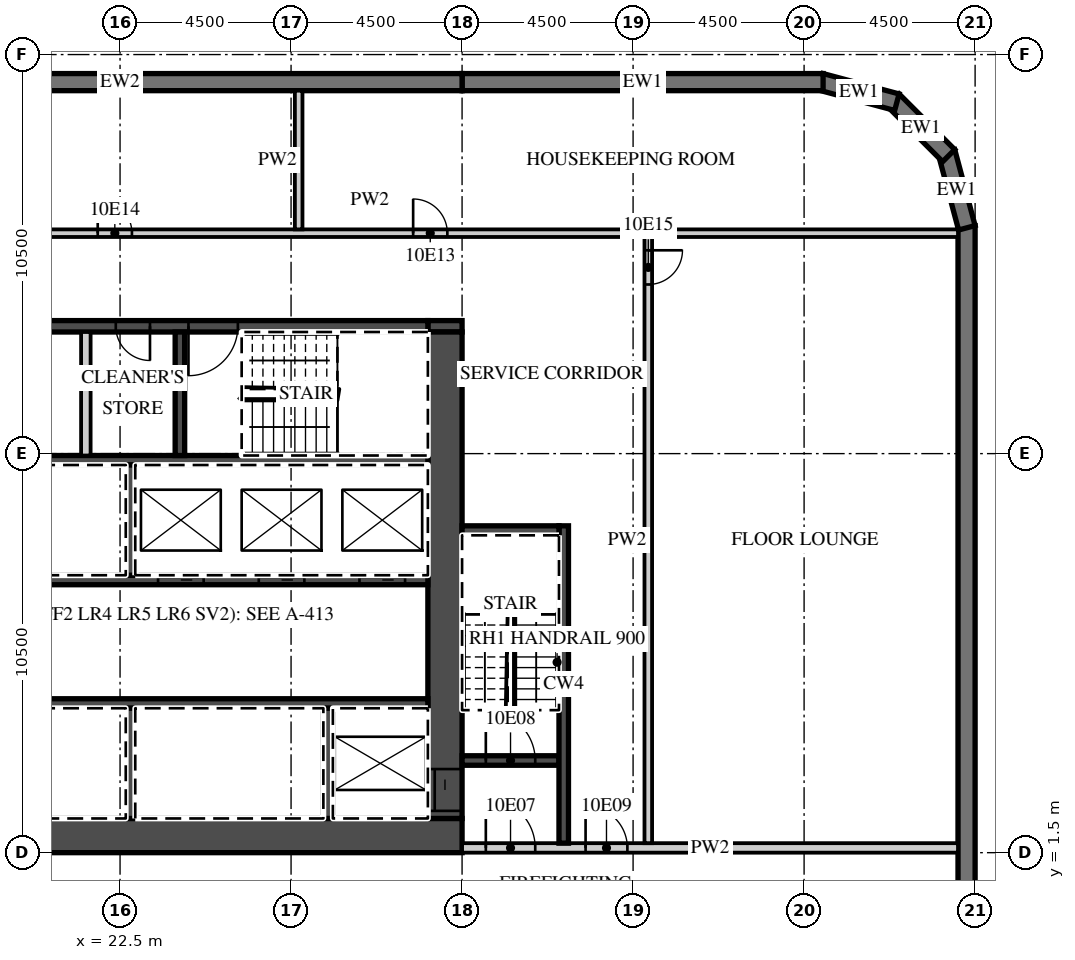
"""IFC4 building model, lengths in metres.
Left out: names, types, materials, properties, quantities, classifications, styles, units other than length and angle.
Written with IfcOpenShell. Run it as: python <this file> out.ifc"""

import sys

from ifc_helpers import new_model, si_unit, direction, frame, frame_2d, origin, place, context, subcontext, project, spatial, polyline, rectangle, outline, extrude, element, fill, save


model = new_model("IFC4")
c1 = context("Model", 3, precision=1e-05, world=origin(), true_north=direction((0.0, 1.0)))
c2 = subcontext(c1, "Body", "Model", "MODEL_VIEW")
j1 = project(units=[si_unit("LENGTHUNIT", "METRE"), si_unit("PLANEANGLEUNIT", "RADIAN")], contexts=[c1])
p1 = place(None, origin())
s1 = spatial("IfcSite", under=j1, at=p1, CompositionType="ELEMENT")
p2 = place(p1, origin())
s2 = spatial("IfcBuilding", under=s1, at=p2, CompositionType="ELEMENT")
p3 = place(p2, frame((0.0, 0.0, 63.3)))
s3 = spatial("IfcBuildingStorey", under=s2, at=p3, CompositionType="ELEMENT", Elevation=63.3)
p4 = place(p3, frame((44.775, -18.0, 0.0), z_axis=(0.0, 0.0, 1.0), x_axis=(0.0, 1.0, 0.0)))
e1 = element("IfcWall", 1, at=p4, inside=s3, PredefinedType="SOLIDWALL", context=c2, shape_type="SweptSolid", body=[
    extrude(rectangle(XDim=36.0, YDim=0.45, at=frame_2d((18.0, 0.0))), origin(), (0.0, 0.0, 1.0), 3.02),
])
p5 = place(p4, frame((3.9, 0.0, 0.45)))
e2 = element("IfcOpeningElement", 2, at=p5, cuts=e1, PredefinedType="OPENING", context=c2, shape_type="SweptSolid", body=[
    extrude(rectangle(XDim=3.3, YDim=2.25, at=frame_2d((1.65, 1.125))), frame((0.0, 0.235, 0.0), z_axis=(0.0, -1.0, 0.0), x_axis=(1.0, 0.0, 0.0)), (0.0, 0.0, 1.0), 0.47),
])
p6 = place(p4, frame((8.4, 0.0, 0.45)))
e3 = element("IfcOpeningElement", 3, at=p6, cuts=e1, PredefinedType="OPENING", context=c2, shape_type="SweptSolid", body=[
    extrude(rectangle(XDim=3.3, YDim=2.25, at=frame_2d((1.65, 1.125))), frame((0.0, 0.235, 0.0), z_axis=(0.0, -1.0, 0.0), x_axis=(1.0, 0.0, 0.0)), (0.0, 0.0, 1.0), 0.47),
])
p7 = place(p4, frame((12.9, 0.0, 0.45)))
e4 = element("IfcOpeningElement", 4, at=p7, cuts=e1, PredefinedType="OPENING", context=c2, shape_type="SweptSolid", body=[
    extrude(rectangle(XDim=3.3, YDim=2.25, at=frame_2d((1.65, 1.125))), frame((0.0, 0.235, 0.0), z_axis=(0.0, -1.0, 0.0), x_axis=(1.0, 0.0, 0.0)), (0.0, 0.0, 1.0), 0.47),
])
p8 = place(p3, frame((44.783, 17.942, 0.0), z_axis=(0.0, 0.0, 1.0), x_axis=(-0.25881466832, 0.965926999034, 0.0)))
e5 = element("IfcWall", 5, at=p8, inside=s3, PredefinedType="SOLIDWALL", context=c2, shape_type="SweptSolid", body=[
    extrude(outline(polyline([(0.0, -0.225), (2.071, -0.225), (1.95, 0.225), (0.121, 0.225), (0.0, -0.225)])), origin(), (0.0, 0.0, 1.0), 3.02),
])
p9 = place(p3, frame((44.305, 19.841, 0.0), z_axis=(0.0, 0.0, 1.0), x_axis=(-0.707106781187, 0.707106781187, 0.0)))
e6 = element("IfcWall", 6, at=p9, inside=s3, PredefinedType="SOLIDWALL", context=c2, shape_type="SweptSolid", body=[
    extrude(outline(polyline([(0.0, -0.225), (2.071, -0.225), (1.95, 0.225), (0.121, 0.225), (0.0, -0.225)])), origin(), (0.0, 0.0, 1.0), 3.02),
])
p10 = place(p3, frame((42.942, 21.247, 0.0), z_axis=(0.0, 0.0, 1.0), x_axis=(-0.965926999034, 0.25881466832, 0.0)))
e7 = element("IfcWall", 7, at=p10, inside=s3, PredefinedType="SOLIDWALL", context=c2, shape_type="SweptSolid", body=[
    extrude(outline(polyline([(-0.0, -0.225), (2.07, -0.225), (1.95, 0.225), (0.12, 0.225), (-0.0, -0.225)])), origin(), (0.0, 0.0, 1.0), 3.02),
])
p11 = place(p3, frame((41.0, 21.775, 0.0), z_axis=(0.0, 0.0, 1.0), x_axis=(-1.0, 0.0, 0.0)))
e8 = element("IfcWall", 8, at=p11, inside=s3, PredefinedType="SOLIDWALL", context=c2, shape_type="SweptSolid", body=[
    extrude(rectangle(XDim=9.5, YDim=0.45, at=frame_2d((4.75, 0.0))), origin(), (0.0, 0.0, 1.0), 3.02),
])
p12 = place(p3, frame((31.5, 21.775, 0.0), z_axis=(0.0, 0.0, 1.0), x_axis=(-1.0, 0.0, 0.0)))
e9 = element("IfcWall", 9, at=p12, inside=s3, PredefinedType="SOLIDWALL", context=c2, shape_type="SweptSolid", body=[
    extrude(rectangle(XDim=18.0, YDim=0.45, at=frame_2d((9.0, 0.0))), origin(), (0.0, 0.0, 1.0), 3.02),
])
p13 = place(p3, frame((13.5, 1.95, 0.0), z_axis=(0.0, 0.0, 1.0), x_axis=(1.0, 0.0, 0.0)))
e10 = element("IfcWall", 10, at=p13, inside=s3, PredefinedType="SHEAR", context=c2, shape_type="SweptSolid", body=[
    extrude(rectangle(XDim=18.0, YDim=0.9, at=frame_2d((9.0, 0.0))), origin(), (0.0, 0.0, 1.0), 3.02),
])
p14 = place(p13, frame((1.475, 0.0, 0.0)))
e11 = element("IfcOpeningElement", 11, at=p14, cuts=e10, PredefinedType="OPENING", context=c2, shape_type="SweptSolid", body=[
    extrude(rectangle(XDim=1.8, YDim=2.1, at=frame_2d((0.9, 1.05))), frame((0.0, 0.46, 0.0), z_axis=(0.0, -1.0, 0.0), x_axis=(1.0, 0.0, 0.0)), (0.0, 0.0, 1.0), 0.92),
])
p15 = place(p3, frame((30.6, 15.35, 0.0), z_axis=(0.0, 0.0, 1.0), x_axis=(1.0, 0.0, 0.0)))
e12 = element("IfcWall", 12, at=p15, inside=s3, PredefinedType="SHEAR", context=c2, shape_type="SweptSolid", body=[
    extrude(rectangle(XDim=0.9, YDim=0.3, at=frame_2d((0.45, 0.0))), origin(), (0.0, 0.0, 1.0), 3.02),
])
p16 = place(p3, frame((20.3, 15.35, 0.0), z_axis=(0.0, 0.0, 1.0), x_axis=(1.0, 0.0, 0.0)))
e13 = element("IfcWall", 13, at=p16, inside=s3, PredefinedType="SHEAR", context=c2, shape_type="SweptSolid", body=[
    extrude(rectangle(XDim=10.3, YDim=0.3, at=frame_2d((5.15, 0.0))), origin(), (0.0, 0.0, 1.0), 3.02),
])
p17 = place(p16, frame((4.0, 0.0, 0.0)))
e14 = element("IfcOpeningElement", 14, at=p17, cuts=e13, PredefinedType="OPENING", context=c2, shape_type="SweptSolid", body=[
    extrude(rectangle(XDim=1.3, YDim=2.1, at=frame_2d((0.65, 1.05))), frame((0.0, 0.16, 0.0), z_axis=(0.0, -1.0, 0.0), x_axis=(1.0, 0.0, 0.0)), (0.0, 0.0, 1.0), 0.32),
])
p18 = place(p16, frame((2.087, 0.0, 0.0)))
e15 = element("IfcOpeningElement", 15, at=p18, cuts=e13, PredefinedType="OPENING", context=c2, shape_type="SweptSolid", body=[
    extrude(rectangle(XDim=0.9, YDim=2.1, at=frame_2d((0.45, 1.05))), frame((0.0, 0.16, 0.0), z_axis=(0.0, -1.0, 0.0), x_axis=(1.0, 0.0, 0.0)), (0.0, 0.0, 1.0), 0.32),
])
p19 = place(p3, frame((31.05, 2.4, 0.0), z_axis=(0.0, 0.0, 1.0), x_axis=(0.0, 1.0, 0.0)))
e16 = element("IfcWall", 16, at=p19, inside=s3, PredefinedType="SHEAR", context=c2, shape_type="SweptSolid", body=[
    extrude(rectangle(XDim=12.8, YDim=0.9, at=frame_2d((6.4, 0.0))), origin(), (0.0, 0.0, 1.0), 3.02),
])
p20 = place(p19, frame((0.2, 0.0, 0.0)))
e17 = element("IfcOpeningElement", 17, at=p20, cuts=e16, PredefinedType="OPENING", context=c2, shape_type="SweptSolid", body=[
    extrude(rectangle(XDim=1.1, YDim=2.1, at=frame_2d((0.55, 1.05))), frame((0.0, 0.46, 0.0), z_axis=(0.0, -1.0, 0.0), x_axis=(1.0, 0.0, 0.0)), (0.0, 0.0, 1.0), 0.92),
])
p21 = place(p3, frame((17.6, 5.425, 0.0), z_axis=(0.0, 0.0, 1.0), x_axis=(1.0, 0.0, 0.0)))
e18 = element("IfcWall", 18, at=p21, inside=s3, PredefinedType="SHEAR", context=c2, shape_type="SweptSolid", body=[
    extrude(rectangle(XDim=13.0, YDim=0.25, at=frame_2d((6.5, 0.0))), origin(), (0.0, 0.0, 1.0), 3.02),
])
for number, where, z_axis, x_axis in (
    (19, (27.975, 2.4, 0.0), (0.0, 0.0, 1.0), (0.0, 1.0, 0.0)),
    (20, (22.775, 2.4, 0.0), (0.0, 0.0, 1.0), (0.0, 1.0, 0.0)),
):
    element("IfcWall", number, at=place(p3, frame(where, z_axis=z_axis, x_axis=x_axis)), inside=s3, PredefinedType="SHEAR", context=c2, shape_type="SweptSolid", body=[
        extrude(rectangle(XDim=2.9, YDim=0.25, at=frame_2d((1.45, 0.0))), origin(), (0.0, 0.0, 1.0), 3.02),
    ])
p22 = place(p3, frame((14.4, 8.675, 0.0), z_axis=(0.0, 0.0, 1.0), x_axis=(1.0, 0.0, 0.0)))
e21 = element("IfcWall", 21, at=p22, inside=s3, PredefinedType="SHEAR", context=c2, shape_type="SweptSolid", body=[
    extrude(rectangle(XDim=16.2, YDim=0.25, at=frame_2d((8.1, 0.0))), origin(), (0.0, 0.0, 1.0), 3.02),
])
p23 = place(p22, frame((14.4, 0.0, 0.0)))
e22 = element("IfcOpeningElement", 22, at=p23, cuts=e21, PredefinedType="OPENING", context=c2, shape_type="SweptSolid", body=[
    extrude(rectangle(XDim=1.2, YDim=2.1, at=frame_2d((0.6, 1.05))), frame((0.0, 0.135, 0.0), z_axis=(0.0, -1.0, 0.0), x_axis=(1.0, 0.0, 0.0)), (0.0, 0.0, 1.0), 0.27),
])
p24 = place(p22, frame((11.75, 0.0, 0.0)))
e23 = element("IfcOpeningElement", 23, at=p24, cuts=e21, PredefinedType="OPENING", context=c2, shape_type="SweptSolid", body=[
    extrude(rectangle(XDim=1.2, YDim=2.1, at=frame_2d((0.6, 1.05))), frame((0.0, 0.135, 0.0), z_axis=(0.0, -1.0, 0.0), x_axis=(1.0, 0.0, 0.0)), (0.0, 0.0, 1.0), 0.27),
])
p25 = place(p22, frame((9.1, 0.0, 0.0)))
e24 = element("IfcOpeningElement", 24, at=p25, cuts=e21, PredefinedType="OPENING", context=c2, shape_type="SweptSolid", body=[
    extrude(rectangle(XDim=1.2, YDim=2.1, at=frame_2d((0.6, 1.05))), frame((0.0, 0.135, 0.0), z_axis=(0.0, -1.0, 0.0), x_axis=(1.0, 0.0, 0.0)), (0.0, 0.0, 1.0), 0.27),
])
p26 = place(p22, frame((0.65, 0.0, 0.0)))
e25 = element("IfcOpeningElement", 25, at=p26, cuts=e21, PredefinedType="OPENING", context=c2, shape_type="SweptSolid", body=[
    extrude(rectangle(XDim=1.3, YDim=2.1, at=frame_2d((0.65, 1.05))), frame((0.0, 0.135, 0.0), z_axis=(0.0, -1.0, 0.0), x_axis=(1.0, 0.0, 0.0)), (0.0, 0.0, 1.0), 0.27),
])
p27 = place(p3, frame((17.35, 11.825, 0.0), z_axis=(0.0, 0.0, 1.0), x_axis=(1.0, 0.0, 0.0)))
e26 = element("IfcWall", 26, at=p27, inside=s3, PredefinedType="SHEAR", context=c2, shape_type="SweptSolid", body=[
    extrude(rectangle(XDim=13.25, YDim=0.25, at=frame_2d((6.625, 0.0))), origin(), (0.0, 0.0, 1.0), 3.02),
])
p28 = place(p3, frame((22.775, 8.8, 0.0), z_axis=(0.0, 0.0, 1.0), x_axis=(0.0, 1.0, 0.0)))
e27 = element("IfcWall", 27, at=p28, inside=s3, PredefinedType="SHEAR", context=c2, shape_type="SweptSolid", body=[
    extrude(rectangle(XDim=2.9, YDim=0.25, at=frame_2d((1.45, 0.0))), origin(), (0.0, 0.0, 1.0), 3.02),
])
p29 = place(p3, frame((24.075, 11.95, 0.0), z_axis=(0.0, 0.0, 1.0), x_axis=(0.0, 1.0, 0.0)))
e28 = element("IfcWall", 28, at=p29, inside=s3, PredefinedType="SHEAR", context=c2, shape_type="SweptSolid", body=[
    extrude(rectangle(XDim=3.25, YDim=0.25, at=frame_2d((1.625, 0.0))), origin(), (0.0, 0.0, 1.0), 3.02),
])
p30 = place(p3, frame((21.6, 11.95, 0.0), z_axis=(0.0, 0.0, 1.0), x_axis=(0.0, 1.0, 0.0)))
e29 = element("IfcWall", 29, at=p30, inside=s3, PredefinedType="PARTITIONING", context=c2, shape_type="SweptSolid", body=[
    extrude(rectangle(XDim=3.25, YDim=0.25, at=frame_2d((1.625, 0.0))), origin(), (0.0, 0.0, 1.0), 3.02),
])
p31 = place(p3, frame((31.5, 1.625, 0.0), z_axis=(0.0, 0.0, 1.0), x_axis=(1.0, 0.0, 0.0)))
e30 = element("IfcWall", 30, at=p31, inside=s3, PredefinedType="PARTITIONING", context=c2, shape_type="SweptSolid", body=[
    extrude(rectangle(XDim=13.05, YDim=0.25, at=frame_2d((6.525, 0.0))), origin(), (0.0, 0.0, 1.0), 3.02),
])
p32 = place(p31, frame((0.625, 0.0, 0.0)))
e31 = element("IfcOpeningElement", 31, at=p32, cuts=e30, PredefinedType="OPENING", context=c2, shape_type="SweptSolid", body=[
    extrude(rectangle(XDim=1.3, YDim=2.1, at=frame_2d((0.65, 1.05))), frame((0.0, 0.135, 0.0), z_axis=(0.0, -1.0, 0.0), x_axis=(1.0, 0.0, 0.0)), (0.0, 0.0, 1.0), 0.27),
])
p33 = place(p31, frame((3.25, 0.0, 0.0)))
e32 = element("IfcOpeningElement", 32, at=p33, cuts=e30, PredefinedType="OPENING", context=c2, shape_type="SweptSolid", body=[
    extrude(rectangle(XDim=1.1, YDim=2.1, at=frame_2d((0.55, 1.05))), frame((0.0, 0.135, 0.0), z_axis=(0.0, -1.0, 0.0), x_axis=(1.0, 0.0, 0.0)), (0.0, 0.0, 1.0), 0.27),
])
p34 = place(p3, frame((31.5, 3.925, 0.0), z_axis=(0.0, 0.0, 1.0), x_axis=(1.0, 0.0, 0.0)))
e33 = element("IfcWall", 33, at=p34, inside=s3, PredefinedType="SHEAR", context=c2, shape_type="SweptSolid", body=[
    extrude(rectangle(XDim=2.55, YDim=0.25, at=frame_2d((1.275, 0.0))), origin(), (0.0, 0.0, 1.0), 3.02),
])
p35 = place(p34, frame((0.625, 0.0, 0.0)))
e34 = element("IfcOpeningElement", 34, at=p35, cuts=e33, PredefinedType="OPENING", context=c2, shape_type="SweptSolid", body=[
    extrude(rectangle(XDim=1.3, YDim=2.1, at=frame_2d((0.65, 1.05))), frame((0.0, 0.135, 0.0), z_axis=(0.0, -1.0, 0.0), x_axis=(1.0, 0.0, 0.0)), (0.0, 0.0, 1.0), 0.27),
])
p36 = place(p3, frame((34.175, 1.75, 0.0), z_axis=(0.0, 0.0, 1.0), x_axis=(0.0, 1.0, 0.0)))
e35 = element("IfcWall", 35, at=p36, inside=s3, PredefinedType="SHEAR", context=c2, shape_type="SweptSolid", body=[
    extrude(rectangle(XDim=8.35, YDim=0.25, at=frame_2d((4.175, 0.0))), origin(), (0.0, 0.0, 1.0), 3.02),
])
p37 = place(p3, frame((31.5, 9.975, 0.0), z_axis=(0.0, 0.0, 1.0), x_axis=(1.0, 0.0, 0.0)))
e36 = element("IfcWall", 36, at=p37, inside=s3, PredefinedType="SHEAR", context=c2, shape_type="SweptSolid", body=[
    extrude(rectangle(XDim=2.55, YDim=0.25, at=frame_2d((1.275, 0.0))), origin(), (0.0, 0.0, 1.0), 3.02),
])
p38 = place(p3, frame((36.4, 1.75, 0.0), z_axis=(0.0, 0.0, 1.0), x_axis=(0.0, 1.0, 0.0)))
e37 = element("IfcWall", 37, at=p38, inside=s3, PredefinedType="PARTITIONING", context=c2, shape_type="SweptSolid", body=[
    extrude(rectangle(XDim=15.95, YDim=0.2, at=frame_2d((7.975, 0.0))), origin(), (0.0, 0.0, 1.0), 3.02),
])
p39 = place(p38, frame((14.7, 0.0, 0.0)))
e38 = element("IfcOpeningElement", 38, at=p39, cuts=e37, PredefinedType="OPENING", context=c2, shape_type="SweptSolid", body=[
    extrude(rectangle(XDim=0.9, YDim=2.1, at=frame_2d((0.45, 1.05))), frame((0.0, 0.11, 0.0), z_axis=(0.0, -1.0, 0.0), x_axis=(1.0, 0.0, 0.0)), (0.0, 0.0, 1.0), 0.22),
])
p40 = place(p3, frame((13.6, 17.8, 0.0), z_axis=(0.0, 0.0, 1.0), x_axis=(1.0, 0.0, 0.0)))
e39 = element("IfcWall", 39, at=p40, inside=s3, PredefinedType="PARTITIONING", context=c2, shape_type="SweptSolid", body=[
    extrude(rectangle(XDim=30.95, YDim=0.2, at=frame_2d((15.475, 0.0))), origin(), (0.0, 0.0, 1.0), 3.02),
])
p41 = place(p40, frame((16.613, 0.0, 0.0)))
e40 = element("IfcOpeningElement", 40, at=p41, cuts=e39, PredefinedType="OPENING", context=c2, shape_type="SweptSolid", body=[
    extrude(rectangle(XDim=0.9, YDim=2.1, at=frame_2d((0.45, 1.05))), frame((0.0, 0.11, 0.0), z_axis=(0.0, -1.0, 0.0), x_axis=(1.0, 0.0, 0.0)), (0.0, 0.0, 1.0), 0.22),
])
p42 = place(p40, frame((8.312, 0.0, 0.0)))
e41 = element("IfcOpeningElement", 41, at=p42, cuts=e39, PredefinedType="OPENING", context=c2, shape_type="SweptSolid", body=[
    extrude(rectangle(XDim=0.9, YDim=2.1, at=frame_2d((0.45, 1.05))), frame((0.0, 0.11, 0.0), z_axis=(0.0, -1.0, 0.0), x_axis=(1.0, 0.0, 0.0)), (0.0, 0.0, 1.0), 0.22),
])
p43 = place(p3, frame((27.2, 17.9, 0.0), z_axis=(0.0, 0.0, 1.0), x_axis=(0.0, 1.0, 0.0)))
e42 = element("IfcWall", 42, at=p43, inside=s3, PredefinedType="PARTITIONING", context=c2, shape_type="SweptSolid", body=[
    extrude(rectangle(XDim=3.65, YDim=0.2, at=frame_2d((1.825, 0.0))), origin(), (0.0, 0.0, 1.0), 3.02),
])
p44 = place(p23, origin())
e43 = element("IfcDoor", 43, at=p44, inside=s3, OperationType="SLIDING_TO_LEFT", PredefinedType="DOOR", context=c2, shape_type="SweptSolid", body=[
    extrude(rectangle(XDim=1.2, YDim=2.1, at=frame_2d((0.6, 1.05))), frame((0.0, 0.025, 0.0), z_axis=(0.0, -1.0, 0.0), x_axis=(1.0, 0.0, 0.0)), (0.0, 0.0, 1.0), 0.05),
])
fill(e22, e43)
p45 = place(p24, origin())
e44 = element("IfcDoor", 44, at=p45, inside=s3, OperationType="SLIDING_TO_RIGHT", PredefinedType="DOOR", context=c2, shape_type="SweptSolid", body=[
    extrude(rectangle(XDim=1.2, YDim=2.1, at=frame_2d((0.6, 1.05))), frame((0.0, 0.025, 0.0), z_axis=(0.0, -1.0, 0.0), x_axis=(1.0, 0.0, 0.0)), (0.0, 0.0, 1.0), 0.05),
])
fill(e23, e44)
p46 = place(p25, origin())
e45 = element("IfcDoor", 45, at=p46, inside=s3, OperationType="SLIDING_TO_RIGHT", PredefinedType="DOOR", context=c2, shape_type="SweptSolid", body=[
    extrude(rectangle(XDim=1.2, YDim=2.1, at=frame_2d((0.6, 1.05))), frame((0.0, 0.025, 0.0), z_axis=(0.0, -1.0, 0.0), x_axis=(1.0, 0.0, 0.0)), (0.0, 0.0, 1.0), 0.05),
])
fill(e24, e45)
p47 = place(p20, origin())
e46 = element("IfcDoor", 46, at=p47, inside=s3, OperationType="SLIDING_TO_LEFT", PredefinedType="DOOR", context=c2, shape_type="SweptSolid", body=[
    extrude(rectangle(XDim=1.1, YDim=2.1, at=frame_2d((0.55, 1.05))), frame((0.0, 0.025, 0.0), z_axis=(0.0, -1.0, 0.0), x_axis=(1.0, 0.0, 0.0)), (0.0, 0.0, 1.0), 0.05),
])
fill(e17, e46)
p48 = place(p32, origin())
e47 = element("IfcDoor", 47, at=p48, inside=s3, OperationType="SINGLE_SWING_LEFT", PredefinedType="DOOR", context=c2, shape_type="SweptSolid", body=[
    extrude(rectangle(XDim=1.3, YDim=2.1, at=frame_2d((0.65, 1.05))), frame((0.0, 0.025, 0.0), z_axis=(0.0, -1.0, 0.0), x_axis=(1.0, 0.0, 0.0)), (0.0, 0.0, 1.0), 0.05),
])
fill(e31, e47)
p49 = place(p35, origin())
e48 = element("IfcDoor", 48, at=p49, inside=s3, OperationType="SINGLE_SWING_LEFT", PredefinedType="DOOR", context=c2, shape_type="SweptSolid", body=[
    extrude(rectangle(XDim=1.3, YDim=2.1, at=frame_2d((0.65, 1.05))), frame((0.0, 0.025, 0.0), z_axis=(0.0, -1.0, 0.0), x_axis=(1.0, 0.0, 0.0)), (0.0, 0.0, 1.0), 0.05),
])
fill(e34, e48)
p50 = place(p33, origin())
e49 = element("IfcDoor", 49, at=p50, inside=s3, OperationType="SINGLE_SWING_LEFT", PredefinedType="DOOR", context=c2, shape_type="SweptSolid", body=[
    extrude(rectangle(XDim=1.1, YDim=2.1, at=frame_2d((0.55, 1.05))), frame((0.0, 0.025, 0.0), z_axis=(0.0, -1.0, 0.0), x_axis=(1.0, 0.0, 0.0)), (0.0, 0.0, 1.0), 0.05),
])
fill(e32, e49)
p51 = place(p17, origin())
e50 = element("IfcDoor", 50, at=p51, inside=s3, OperationType="SINGLE_SWING_LEFT", PredefinedType="DOOR", context=c2, shape_type="SweptSolid", body=[
    extrude(rectangle(XDim=1.3, YDim=2.1, at=frame_2d((0.65, 1.05))), frame((0.0, 0.025, 0.0), z_axis=(0.0, -1.0, 0.0), x_axis=(1.0, 0.0, 0.0)), (0.0, 0.0, 1.0), 0.05),
])
fill(e14, e50)
p52 = place(p18, origin())
e51 = element("IfcDoor", 51, at=p52, inside=s3, OperationType="SINGLE_SWING_RIGHT", PredefinedType="DOOR", context=c2, shape_type="SweptSolid", body=[
    extrude(rectangle(XDim=0.9, YDim=2.1, at=frame_2d((0.45, 1.05))), frame((0.0, 0.025, 0.0), z_axis=(0.0, -1.0, 0.0), x_axis=(1.0, 0.0, 0.0)), (0.0, 0.0, 1.0), 0.05),
])
fill(e15, e51)
p53 = place(p41, origin())
e52 = element("IfcDoor", 52, at=p53, inside=s3, OperationType="SINGLE_SWING_LEFT", PredefinedType="DOOR", context=c2, shape_type="SweptSolid", body=[
    extrude(rectangle(XDim=0.9, YDim=2.1, at=frame_2d((0.45, 1.05))), frame((0.0, 0.025, 0.0), z_axis=(0.0, -1.0, 0.0), x_axis=(1.0, 0.0, 0.0)), (0.0, 0.0, 1.0), 0.05),
])
fill(e40, e52)
p54 = place(p42, origin())
e53 = element("IfcDoor", 53, at=p54, inside=s3, OperationType="SINGLE_SWING_LEFT", PredefinedType="DOOR", context=c2, shape_type="SweptSolid", body=[
    extrude(rectangle(XDim=0.9, YDim=2.1, at=frame_2d((0.45, 1.05))), frame((0.0, 0.025, 0.0), z_axis=(0.0, -1.0, 0.0), x_axis=(1.0, 0.0, 0.0)), (0.0, 0.0, 1.0), 0.05),
])
fill(e41, e53)
p55 = place(p39, origin())
e54 = element("IfcDoor", 54, at=p55, inside=s3, OperationType="SINGLE_SWING_RIGHT", PredefinedType="DOOR", context=c2, shape_type="SweptSolid", body=[
    extrude(rectangle(XDim=0.9, YDim=2.1, at=frame_2d((0.45, 1.05))), frame((0.0, 0.025, 0.0), z_axis=(0.0, -1.0, 0.0), x_axis=(1.0, 0.0, 0.0)), (0.0, 0.0, 1.0), 0.05),
])
fill(e38, e54)
save(model, sys.argv[1])
